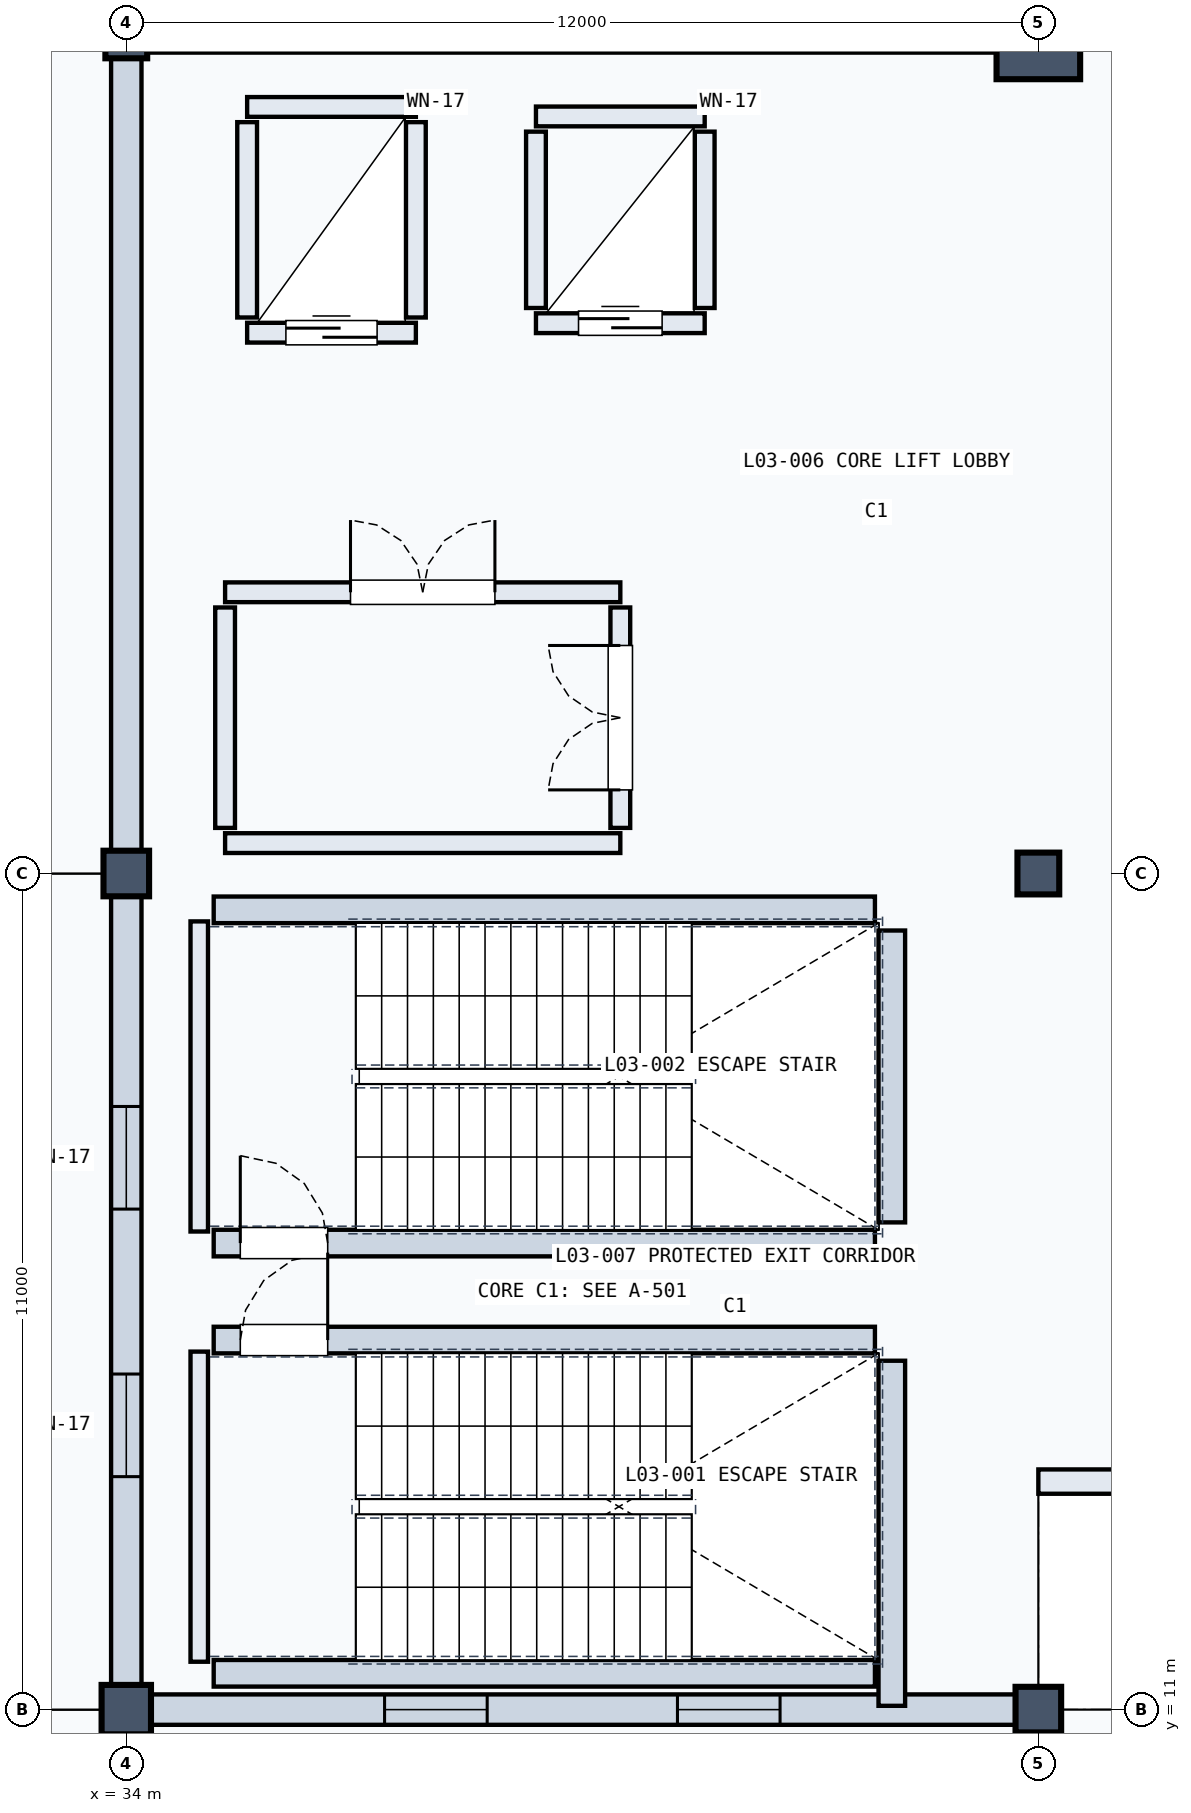
"""IFC4 building model, lengths in metres.
Left out: names, types, materials, properties, quantities, classifications, styles, units other than length and angle.
Written with IfcOpenShell. Run it as: python <this file> out.ifc"""

import sys

from ifc_helpers import new_model, si_unit, direction, frame, frame_2d, origin, origin_2d, place, context, subcontext, project, spatial, rectangle, extrude, element, fill, save


model = new_model("IFC4")
c1 = context("Model", 3, precision=1e-05, world=origin(), true_north=direction((0.0, 1.0)))
c2 = subcontext(c1, "Body", "Model", "MODEL_VIEW")
j1 = project(units=[si_unit("LENGTHUNIT", "METRE"), si_unit("PLANEANGLEUNIT", "RADIAN")], contexts=[c1])
p1 = place(None, origin())
s1 = spatial("IfcSite", under=j1, at=p1, CompositionType="ELEMENT")
p2 = place(p1, origin())
s2 = spatial("IfcBuilding", under=s1, at=p2, CompositionType="ELEMENT")
p3 = place(p2, frame((0.0, 0.0, 14.7)))
s3 = spatial("IfcBuildingStorey", under=s2, at=p3, CompositionType="ELEMENT", Elevation=14.7)
p4 = place(p3, frame((34.0, 11.0, 0.0), z_axis=(0.0, 0.0, 1.0), x_axis=(1.0, 0.0, 0.0)))
e1 = element("IfcColumn", 1, at=p4, inside=s3, PredefinedType="COLUMN", context=c2, shape_type="SweptSolid", body=[
    extrude(rectangle(XDim=0.65, YDim=0.65, at=origin_2d()), origin(), (0.0, 0.0, 1.0), 4.8),
])
p5 = place(p3, frame((34.0, 22.0, 0.0), z_axis=(0.0, 0.0, 1.0), x_axis=(1.0, 0.0, 0.0)))
e2 = element("IfcColumn", 2, at=p5, inside=s3, PredefinedType="COLUMN", context=c2, shape_type="SweptSolid", body=[
    extrude(rectangle(XDim=0.6, YDim=0.6, at=origin_2d()), origin(), (0.0, 0.0, 1.0), 4.8),
])
p6 = place(p3, frame((34.0, 33.0, 0.0), z_axis=(0.0, 0.0, 1.0), x_axis=(1.0, 0.0, 0.0)))
e3 = element("IfcColumn", 3, at=p6, inside=s3, PredefinedType="COLUMN", context=c2, shape_type="SweptSolid", body=[
    extrude(rectangle(XDim=0.55, YDim=0.55, at=origin_2d()), origin(), (0.0, 0.0, 1.0), 4.8),
])
p7 = place(p3, frame((46.0, 11.0, 0.0), z_axis=(0.0, 0.0, 1.0), x_axis=(1.0, 0.0, 0.0)))
e4 = element("IfcColumn", 4, at=p7, inside=s3, PredefinedType="COLUMN", context=c2, shape_type="SweptSolid", body=[
    extrude(rectangle(XDim=0.6, YDim=0.6, at=origin_2d()), origin(), (0.0, 0.0, 1.0), 4.8),
])
p8 = place(p3, frame((46.0, 22.0, 0.0), z_axis=(0.0, 0.0, 1.0), x_axis=(1.0, 0.0, 0.0)))
e5 = element("IfcColumn", 5, at=p8, inside=s3, PredefinedType="COLUMN", context=c2, shape_type="SweptSolid", body=[
    extrude(rectangle(XDim=0.55, YDim=0.55, at=origin_2d()), origin(), (0.0, 0.0, 1.0), 4.8),
])
p9 = place(p3, frame((46.0, 33.0, 0.0), z_axis=(0.0, 0.0, 1.0), x_axis=(1.0, 0.0, 0.0)))
e6 = element("IfcColumn", 6, at=p9, inside=s3, PredefinedType="COLUMN", context=c2, shape_type="SweptSolid", body=[
    extrude(rectangle(XDim=1.1, YDim=1.1, at=origin_2d()), origin(), (0.0, 0.0, 1.0), 4.8),
])
p10 = place(p3, frame((34.22, 11.0, 0.0), z_axis=(0.0, 0.0, 1.0), x_axis=(1.0, 0.0, 0.0)))
e7 = element("IfcWall", 7, at=p10, inside=s3, PredefinedType="SOLIDWALL", context=c2, shape_type="SweptSolid", body=[
    extrude(rectangle(XDim=11.56, YDim=0.4, at=frame_2d((5.78, 0.0))), origin(), (0.0, 0.0, 1.0), 3.79),
])
p11 = place(p10, frame((3.178, 0.0, 0.8)))
e8 = element("IfcOpeningElement", 8, at=p11, cuts=e7, PredefinedType="OPENING", context=c2, shape_type="SweptSolid", body=[
    extrude(rectangle(XDim=1.35, YDim=2.1, at=frame_2d((0.675, 1.05))), frame((0.0, 0.21, 0.0), z_axis=(0.0, -1.0, 0.0), x_axis=(1.0, 0.0, 0.0)), (0.0, 0.0, 1.0), 0.42),
])
p12 = place(p10, frame((7.032, 0.0, 0.8)))
e9 = element("IfcOpeningElement", 9, at=p12, cuts=e7, PredefinedType="OPENING", context=c2, shape_type="SweptSolid", body=[
    extrude(rectangle(XDim=1.35, YDim=2.1, at=frame_2d((0.675, 1.05))), frame((0.0, 0.21, 0.0), z_axis=(0.0, -1.0, 0.0), x_axis=(1.0, 0.0, 0.0)), (0.0, 0.0, 1.0), 0.42),
])
p13 = place(p3, frame((34.0, 11.22, 0.0), z_axis=(0.0, 0.0, 1.0), x_axis=(0.0, 1.0, 0.0)))
e10 = element("IfcWall", 10, at=p13, inside=s3, PredefinedType="SOLIDWALL", context=c2, shape_type="SweptSolid", body=[
    extrude(rectangle(XDim=10.56, YDim=0.4, at=frame_2d((5.28, 0.0))), origin(), (0.0, 0.0, 1.0), 3.79),
])
p14 = place(p13, frame((2.845, 0.0, 0.8)))
e11 = element("IfcOpeningElement", 11, at=p14, cuts=e10, PredefinedType="OPENING", context=c2, shape_type="SweptSolid", body=[
    extrude(rectangle(XDim=1.35, YDim=2.1, at=frame_2d((0.675, 1.05))), frame((0.0, 0.21, 0.0), z_axis=(0.0, -1.0, 0.0), x_axis=(1.0, 0.0, 0.0)), (0.0, 0.0, 1.0), 0.42),
])
p15 = place(p13, frame((6.365, 0.0, 0.8)))
e12 = element("IfcOpeningElement", 12, at=p15, cuts=e10, PredefinedType="OPENING", context=c2, shape_type="SweptSolid", body=[
    extrude(rectangle(XDim=1.35, YDim=2.1, at=frame_2d((0.675, 1.05))), frame((0.0, 0.21, 0.0), z_axis=(0.0, -1.0, 0.0), x_axis=(1.0, 0.0, 0.0)), (0.0, 0.0, 1.0), 0.42),
])
p16 = place(p3, frame((34.22, 33.0, 0.0), z_axis=(0.0, 0.0, 1.0), x_axis=(1.0, 0.0, 0.0)))
e13 = element("IfcWall", 13, at=p16, inside=s3, PredefinedType="SOLIDWALL", context=c2, shape_type="SweptSolid", body=[
    extrude(rectangle(XDim=11.56, YDim=0.4, at=frame_2d((5.78, 0.0))), origin(), (0.0, 0.0, 1.0), 3.59),
])
p17 = place(p16, frame((3.178, 0.0, 0.8)))
e14 = element("IfcOpeningElement", 14, at=p17, cuts=e13, PredefinedType="OPENING", context=c2, shape_type="SweptSolid", body=[
    extrude(rectangle(XDim=1.35, YDim=2.1, at=frame_2d((0.675, 1.05))), frame((0.0, 0.21, 0.0), z_axis=(0.0, -1.0, 0.0), x_axis=(1.0, 0.0, 0.0)), (0.0, 0.0, 1.0), 0.42),
])
p18 = place(p16, frame((7.032, 0.0, 0.8)))
e15 = element("IfcOpeningElement", 15, at=p18, cuts=e13, PredefinedType="OPENING", context=c2, shape_type="SweptSolid", body=[
    extrude(rectangle(XDim=1.35, YDim=2.1, at=frame_2d((0.675, 1.05))), frame((0.0, 0.21, 0.0), z_axis=(0.0, -1.0, 0.0), x_axis=(1.0, 0.0, 0.0)), (0.0, 0.0, 1.0), 0.42),
])
p19 = place(p3, frame((34.0, 22.22, 0.0), z_axis=(0.0, 0.0, 1.0), x_axis=(0.0, 1.0, 0.0)))
e16 = element("IfcWall", 16, at=p19, inside=s3, PredefinedType="SOLIDWALL", context=c2, shape_type="SweptSolid", body=[
    extrude(rectangle(XDim=10.56, YDim=0.4, at=frame_2d((5.28, 0.0))), origin(), (0.0, 0.0, 1.0), 3.79),
])
p20 = place(p3, frame((46.0, 14.0, 0.0), z_axis=(0.0, 0.0, 1.0), x_axis=(1.0, 0.0, 0.0)))
e17 = element("IfcWall", 17, at=p20, inside=s3, PredefinedType="SOLIDWALL", context=c2, shape_type="SweptSolid", body=[
    extrude(rectangle(XDim=8.574, YDim=0.32, at=frame_2d((4.287, 0.0))), origin(), (0.0, 0.0, 1.0), 3.79),
])
p21 = place(p20, frame((2.887, 0.0, 0.95)))
e18 = element("IfcOpeningElement", 18, at=p21, cuts=e17, PredefinedType="OPENING", context=c2, shape_type="SweptSolid", body=[
    extrude(rectangle(XDim=2.8, YDim=1.5, at=frame_2d((1.4, 0.75))), frame((0.0, 0.17, 0.0), z_axis=(0.0, -1.0, 0.0), x_axis=(1.0, 0.0, 0.0)), (0.0, 0.0, 1.0), 0.34),
])
p22 = place(p3, frame((34.96, 11.63, 0.0), z_axis=(0.0, 0.0, 1.0), x_axis=(0.0, 1.0, 0.0)))
e19 = element("IfcWall", 19, at=p22, inside=s3, PredefinedType="SOLIDWALL", context=c2, shape_type="SweptSolid", body=[
    extrude(rectangle(XDim=4.08, YDim=0.23, at=frame_2d((2.04, 0.0))), origin(), (0.0, 0.0, 1.0), 4.46),
])
p23 = place(p3, frame((44.072, 11.05, 0.0), z_axis=(0.0, 0.0, 1.0), x_axis=(0.0, 1.0, 0.0)))
e20 = element("IfcWall", 20, at=p23, inside=s3, PredefinedType="SOLIDWALL", context=c2, shape_type="SweptSolid", body=[
    extrude(rectangle(XDim=4.54, YDim=0.35, at=frame_2d((2.27, 0.0))), origin(), (0.0, 0.0, 1.0), 4.46),
])
p24 = place(p3, frame((35.15, 11.478, 0.0), z_axis=(0.0, 0.0, 1.0), x_axis=(1.0, 0.0, 0.0)))
e21 = element("IfcWall", 21, at=p24, inside=s3, PredefinedType="SOLIDWALL", context=c2, shape_type="SweptSolid", body=[
    extrude(rectangle(XDim=8.7, YDim=0.35, at=frame_2d((4.35, 0.0))), origin(), (0.0, 0.0, 1.0), 4.46),
])
p25 = place(p3, frame((35.15, 15.862, 0.0), z_axis=(0.0, 0.0, 1.0), x_axis=(1.0, 0.0, 0.0)))
e22 = element("IfcWall", 22, at=p25, inside=s3, PredefinedType="SOLIDWALL", context=c2, shape_type="SweptSolid", body=[
    extrude(rectangle(XDim=8.7, YDim=0.35, at=frame_2d((4.35, 0.0))), origin(), (0.0, 0.0, 1.0), 4.46),
])
p26 = place(p25, frame((0.35, 0.0, 0.0)))
e23 = element("IfcOpeningElement", 23, at=p26, cuts=e22, PredefinedType="OPENING", context=c2, shape_type="SweptSolid", body=[
    extrude(rectangle(XDim=1.15, YDim=2.2, at=frame_2d((0.575, 1.1))), frame((0.0, 0.185, 0.0), z_axis=(0.0, -1.0, 0.0), x_axis=(1.0, 0.0, 0.0)), (0.0, 0.0, 1.0), 0.37),
])
p27 = place(p3, frame((34.96, 17.29, 0.0), z_axis=(0.0, 0.0, 1.0), x_axis=(0.0, 1.0, 0.0)))
e24 = element("IfcWall", 24, at=p27, inside=s3, PredefinedType="SOLIDWALL", context=c2, shape_type="SweptSolid", body=[
    extrude(rectangle(XDim=4.08, YDim=0.23, at=frame_2d((2.04, 0.0))), origin(), (0.0, 0.0, 1.0), 4.46),
])
p28 = place(p3, frame((44.072, 17.41, 0.0), z_axis=(0.0, 0.0, 1.0), x_axis=(0.0, 1.0, 0.0)))
e25 = element("IfcWall", 25, at=p28, inside=s3, PredefinedType="SOLIDWALL", context=c2, shape_type="SweptSolid", body=[
    extrude(rectangle(XDim=3.84, YDim=0.35, at=frame_2d((1.92, 0.0))), origin(), (0.0, 0.0, 1.0), 4.46),
])
p29 = place(p3, frame((35.15, 17.138, 0.0), z_axis=(0.0, 0.0, 1.0), x_axis=(1.0, 0.0, 0.0)))
e26 = element("IfcWall", 26, at=p29, inside=s3, PredefinedType="SOLIDWALL", context=c2, shape_type="SweptSolid", body=[
    extrude(rectangle(XDim=8.7, YDim=0.35, at=frame_2d((4.35, 0.0))), origin(), (0.0, 0.0, 1.0), 4.46),
])
p30 = place(p29, frame((0.35, 0.0, 0.0)))
e27 = element("IfcOpeningElement", 27, at=p30, cuts=e26, PredefinedType="OPENING", context=c2, shape_type="SweptSolid", body=[
    extrude(rectangle(XDim=1.15, YDim=2.2, at=frame_2d((0.575, 1.1))), frame((0.0, 0.185, 0.0), z_axis=(0.0, -1.0, 0.0), x_axis=(1.0, 0.0, 0.0)), (0.0, 0.0, 1.0), 0.37),
])
p31 = place(p3, frame((35.15, 21.522, 0.0), z_axis=(0.0, 0.0, 1.0), x_axis=(1.0, 0.0, 0.0)))
e28 = element("IfcWall", 28, at=p31, inside=s3, PredefinedType="SOLIDWALL", context=c2, shape_type="SweptSolid", body=[
    extrude(rectangle(XDim=8.7, YDim=0.35, at=frame_2d((4.35, 0.0))), origin(), (0.0, 0.0, 1.0), 4.46),
])
p32 = place(p3, frame((35.59, 29.115, 0.0), z_axis=(0.0, 0.0, 1.0), x_axis=(1.0, 0.0, 0.0)))
e29 = element("IfcWall", 29, at=p32, inside=s3, PredefinedType="SOLIDWALL", context=c2, shape_type="SweptSolid", body=[
    extrude(rectangle(XDim=2.22, YDim=0.26, at=frame_2d((1.11, 0.0))), origin(), (0.0, 0.0, 1.0), 4.46),
])
p33 = place(p32, frame((0.51, 0.0, 0.0)))
e30 = element("IfcOpeningElement", 30, at=p33, cuts=e29, PredefinedType="OPENING", context=c2, shape_type="SweptSolid", body=[
    extrude(rectangle(XDim=1.2, YDim=2.2, at=frame_2d((0.6, 1.1))), frame((0.0, 0.14, 0.0), z_axis=(0.0, -1.0, 0.0), x_axis=(1.0, 0.0, 0.0)), (0.0, 0.0, 1.0), 0.28),
])
p34 = place(p3, frame((35.59, 32.085, 0.0), z_axis=(0.0, 0.0, 1.0), x_axis=(1.0, 0.0, 0.0)))
e31 = element("IfcWall", 31, at=p34, inside=s3, PredefinedType="SOLIDWALL", context=c2, shape_type="SweptSolid", body=[
    extrude(rectangle(XDim=2.22, YDim=0.26, at=frame_2d((1.11, 0.0))), origin(), (0.0, 0.0, 1.0), 4.46),
])
for number, where, z_axis, x_axis in (
    (32, (35.59, 29.315, 0.0), (0.0, 0.0, 1.0), (0.0, 1.0, 0.0)),
    (33, (37.81, 29.315, 0.0), (0.0, 0.0, 1.0), (0.0, 1.0, 0.0)),
):
    element("IfcWall", number, at=place(p3, frame(where, z_axis=z_axis, x_axis=x_axis)), inside=s3, PredefinedType="SOLIDWALL", context=c2, shape_type="SweptSolid", body=[
        extrude(rectangle(XDim=2.57, YDim=0.26, at=frame_2d((1.285, 0.0))), origin(), (0.0, 0.0, 1.0), 4.46),
    ])
p35 = place(p3, frame((39.39, 29.24, 0.0), z_axis=(0.0, 0.0, 1.0), x_axis=(1.0, 0.0, 0.0)))
e34 = element("IfcWall", 34, at=p35, inside=s3, PredefinedType="SOLIDWALL", context=c2, shape_type="SweptSolid", body=[
    extrude(rectangle(XDim=2.22, YDim=0.26, at=frame_2d((1.11, 0.0))), origin(), (0.0, 0.0, 1.0), 4.46),
])
p36 = place(p35, frame((0.56, 0.0, 0.0)))
e35 = element("IfcOpeningElement", 35, at=p36, cuts=e34, PredefinedType="OPENING", context=c2, shape_type="SweptSolid", body=[
    extrude(rectangle(XDim=1.1, YDim=2.15, at=frame_2d((0.55, 1.075))), frame((0.0, 0.14, 0.0), z_axis=(0.0, -1.0, 0.0), x_axis=(1.0, 0.0, 0.0)), (0.0, 0.0, 1.0), 0.28),
])
p37 = place(p3, frame((39.39, 31.96, 0.0), z_axis=(0.0, 0.0, 1.0), x_axis=(1.0, 0.0, 0.0)))
e36 = element("IfcWall", 36, at=p37, inside=s3, PredefinedType="SOLIDWALL", context=c2, shape_type="SweptSolid", body=[
    extrude(rectangle(XDim=2.22, YDim=0.26, at=frame_2d((1.11, 0.0))), origin(), (0.0, 0.0, 1.0), 4.46),
])
for number, where, z_axis, x_axis in (
    (37, (39.39, 29.44, 0.0), (0.0, 0.0, 1.0), (0.0, 1.0, 0.0)),
    (38, (41.61, 29.44, 0.0), (0.0, 0.0, 1.0), (0.0, 1.0, 0.0)),
):
    element("IfcWall", number, at=place(p3, frame(where, z_axis=z_axis, x_axis=x_axis)), inside=s3, PredefinedType="SOLIDWALL", context=c2, shape_type="SweptSolid", body=[
        extrude(rectangle(XDim=2.32, YDim=0.26, at=frame_2d((1.16, 0.0))), origin(), (0.0, 0.0, 1.0), 4.46),
    ])
p38 = place(p3, frame((35.3, 25.7, 0.0), z_axis=(0.0, 0.0, 1.0), x_axis=(1.0, 0.0, 0.0)))
e39 = element("IfcWall", 39, at=p38, inside=s3, PredefinedType="SOLIDWALL", context=c2, shape_type="SweptSolid", body=[
    extrude(rectangle(XDim=5.2, YDim=0.26, at=frame_2d((2.6, 0.0))), origin(), (0.0, 0.0, 1.0), 4.46),
])
p39 = place(p38, frame((1.65, 0.0, 0.0)))
e40 = element("IfcOpeningElement", 40, at=p39, cuts=e39, PredefinedType="OPENING", context=c2, shape_type="SweptSolid", body=[
    extrude(rectangle(XDim=1.9, YDim=2.2, at=frame_2d((0.95, 1.1))), frame((0.0, 0.14, 0.0), z_axis=(0.0, -1.0, 0.0), x_axis=(1.0, 0.0, 0.0)), (0.0, 0.0, 1.0), 0.28),
])
p40 = place(p3, frame((35.3, 22.4, 0.0), z_axis=(0.0, 0.0, 1.0), x_axis=(1.0, 0.0, 0.0)))
e41 = element("IfcWall", 41, at=p40, inside=s3, PredefinedType="SOLIDWALL", context=c2, shape_type="SweptSolid", body=[
    extrude(rectangle(XDim=5.2, YDim=0.26, at=frame_2d((2.6, 0.0))), origin(), (0.0, 0.0, 1.0), 3.99),
])
p41 = place(p3, frame((35.3, 22.6, 0.0), z_axis=(0.0, 0.0, 1.0), x_axis=(0.0, 1.0, 0.0)))
e42 = element("IfcWall", 42, at=p41, inside=s3, PredefinedType="SOLIDWALL", context=c2, shape_type="SweptSolid", body=[
    extrude(rectangle(XDim=2.9, YDim=0.26, at=frame_2d((1.45, 0.0))), origin(), (0.0, 0.0, 1.0), 4.46),
])
p42 = place(p3, frame((40.5, 22.6, 0.0), z_axis=(0.0, 0.0, 1.0), x_axis=(0.0, 1.0, 0.0)))
e43 = element("IfcWall", 43, at=p42, inside=s3, PredefinedType="SOLIDWALL", context=c2, shape_type="SweptSolid", body=[
    extrude(rectangle(XDim=2.9, YDim=0.26, at=frame_2d((1.45, 0.0))), origin(), (0.0, 0.0, 1.0), 4.46),
])
p43 = place(p42, frame((0.5, 0.0, 0.0)))
e44 = element("IfcOpeningElement", 44, at=p43, cuts=e43, PredefinedType="OPENING", context=c2, shape_type="SweptSolid", body=[
    extrude(rectangle(XDim=1.9, YDim=2.2, at=frame_2d((0.95, 1.1))), frame((0.0, 0.14, 0.0), z_axis=(0.0, -1.0, 0.0), x_axis=(1.0, 0.0, 0.0)), (0.0, 0.0, 1.0), 0.28),
])
p44 = place(p11, origin())
e45 = element("IfcWindow", 45, at=p44, inside=s3, PartitioningType="SINGLE_PANEL", PredefinedType="WINDOW", context=c2, shape_type="SweptSolid", body=[
    extrude(rectangle(XDim=1.35, YDim=2.1, at=frame_2d((0.675, 1.05))), frame((0.0, 0.03, 0.0), z_axis=(0.0, -1.0, 0.0), x_axis=(1.0, 0.0, 0.0)), (0.0, 0.0, 1.0), 0.06),
])
fill(e8, e45)
p45 = place(p12, origin())
e46 = element("IfcWindow", 46, at=p45, inside=s3, PartitioningType="SINGLE_PANEL", PredefinedType="WINDOW", context=c2, shape_type="SweptSolid", body=[
    extrude(rectangle(XDim=1.35, YDim=2.1, at=frame_2d((0.675, 1.05))), frame((0.0, 0.03, 0.0), z_axis=(0.0, -1.0, 0.0), x_axis=(1.0, 0.0, 0.0)), (0.0, 0.0, 1.0), 0.06),
])
fill(e9, e46)
p46 = place(p14, origin())
e47 = element("IfcWindow", 47, at=p46, inside=s3, PartitioningType="SINGLE_PANEL", PredefinedType="WINDOW", context=c2, shape_type="SweptSolid", body=[
    extrude(rectangle(XDim=1.35, YDim=2.1, at=frame_2d((0.675, 1.05))), frame((0.0, 0.03, 0.0), z_axis=(0.0, -1.0, 0.0), x_axis=(1.0, 0.0, 0.0)), (0.0, 0.0, 1.0), 0.06),
])
fill(e11, e47)
p47 = place(p15, origin())
e48 = element("IfcWindow", 48, at=p47, inside=s3, PartitioningType="SINGLE_PANEL", PredefinedType="WINDOW", context=c2, shape_type="SweptSolid", body=[
    extrude(rectangle(XDim=1.35, YDim=2.1, at=frame_2d((0.675, 1.05))), frame((0.0, 0.03, 0.0), z_axis=(0.0, -1.0, 0.0), x_axis=(1.0, 0.0, 0.0)), (0.0, 0.0, 1.0), 0.06),
])
fill(e12, e48)
p48 = place(p26, origin())
e49 = element("IfcDoor", 49, at=p48, inside=s3, OperationType="SINGLE_SWING_RIGHT", PredefinedType="DOOR", context=c2, shape_type="SweptSolid", body=[
    extrude(rectangle(XDim=1.15, YDim=2.2, at=frame_2d((0.575, 1.1))), frame((0.0, 0.025, 0.0), z_axis=(0.0, -1.0, 0.0), x_axis=(1.0, 0.0, 0.0)), (0.0, 0.0, 1.0), 0.05),
])
fill(e23, e49)
p49 = place(p30, origin())
e50 = element("IfcDoor", 50, at=p49, inside=s3, OperationType="SINGLE_SWING_LEFT", PredefinedType="DOOR", context=c2, shape_type="SweptSolid", body=[
    extrude(rectangle(XDim=1.15, YDim=2.2, at=frame_2d((0.575, 1.1))), frame((0.0, 0.025, 0.0), z_axis=(0.0, -1.0, 0.0), x_axis=(1.0, 0.0, 0.0)), (0.0, 0.0, 1.0), 0.05),
])
fill(e27, e50)
p50 = place(p33, origin())
e51 = element("IfcDoor", 51, at=p50, inside=s3, OperationType="SLIDING_TO_LEFT", PredefinedType="DOOR", context=c2, shape_type="SweptSolid", body=[
    extrude(rectangle(XDim=1.2, YDim=2.2, at=frame_2d((0.6, 1.1))), frame((0.0, 0.025, 0.0), z_axis=(0.0, -1.0, 0.0), x_axis=(1.0, 0.0, 0.0)), (0.0, 0.0, 1.0), 0.05),
])
fill(e30, e51)
p51 = place(p36, origin())
e52 = element("IfcDoor", 52, at=p51, inside=s3, OperationType="SLIDING_TO_LEFT", PredefinedType="DOOR", context=c2, shape_type="SweptSolid", body=[
    extrude(rectangle(XDim=1.1, YDim=2.15, at=frame_2d((0.55, 1.075))), frame((0.0, 0.025, 0.0), z_axis=(0.0, -1.0, 0.0), x_axis=(1.0, 0.0, 0.0)), (0.0, 0.0, 1.0), 0.05),
])
fill(e35, e52)
p52 = place(p39, origin())
e53 = element("IfcDoor", 53, at=p52, inside=s3, OperationType="DOUBLE_DOOR_SINGLE_SWING", PredefinedType="DOOR", context=c2, shape_type="SweptSolid", body=[
    extrude(rectangle(XDim=1.9, YDim=2.2, at=frame_2d((0.95, 1.1))), frame((0.0, 0.025, 0.0), z_axis=(0.0, -1.0, 0.0), x_axis=(1.0, 0.0, 0.0)), (0.0, 0.0, 1.0), 0.05),
])
fill(e40, e53)
p53 = place(p43, origin())
e54 = element("IfcDoor", 54, at=p53, inside=s3, OperationType="DOUBLE_DOOR_SINGLE_SWING", PredefinedType="DOOR", context=c2, shape_type="SweptSolid", body=[
    extrude(rectangle(XDim=1.9, YDim=2.2, at=frame_2d((0.95, 1.1))), frame((0.0, 0.025, 0.0), z_axis=(0.0, -1.0, 0.0), x_axis=(1.0, 0.0, 0.0)), (0.0, 0.0, 1.0), 0.05),
])
fill(e44, e54)
save(model, sys.argv[1])
